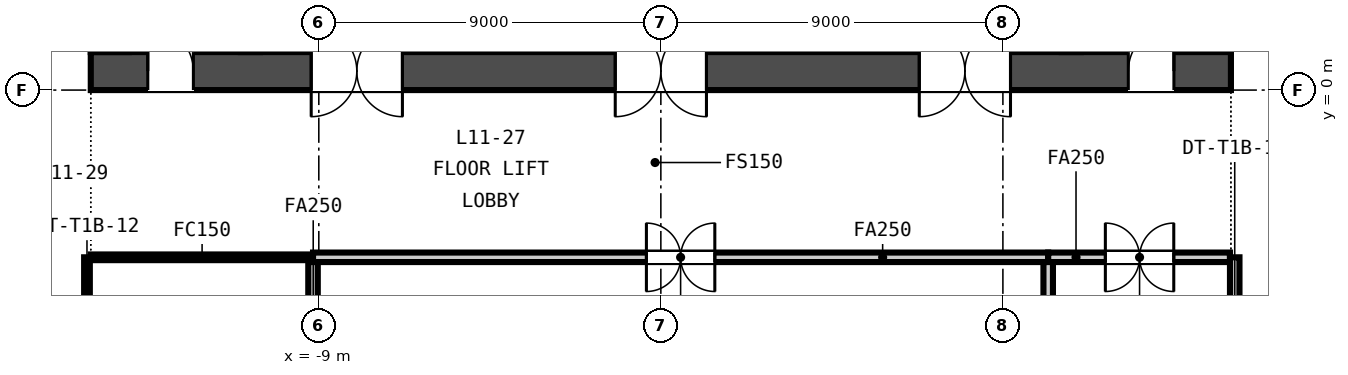
"""IFC4 building model, lengths in metres.
Left out: names, types, materials, properties, quantities, classifications, styles, units other than length and angle.
Written with IfcOpenShell. Run it as: python <this file> out.ifc"""

import sys

from ifc_helpers import new_model, si_unit, direction, frame, frame_2d, origin, place, context, subcontext, project, spatial, rectangle, extrude, element, fill, save


model = new_model("IFC4")
c1 = context("Model", 3, precision=1e-05, world=origin(), true_north=direction((0.0, 1.0)))
c2 = subcontext(c1, "Body", "Model", "MODEL_VIEW")
j1 = project(units=[si_unit("LENGTHUNIT", "METRE"), si_unit("PLANEANGLEUNIT", "RADIAN")], contexts=[c1])
p1 = place(None, origin())
s1 = spatial("IfcSite", under=j1, at=p1, CompositionType="ELEMENT")
p2 = place(p1, origin())
s2 = spatial("IfcBuilding", under=s1, at=p2, CompositionType="ELEMENT")
p3 = place(p2, frame((0.0, 0.0, 54.25)))
s3 = spatial("IfcBuildingStorey", under=s2, at=p3, CompositionType="ELEMENT", Elevation=54.25)
p4 = place(p3, frame((-15.0, 0.5, -0.15), z_axis=(0.0, 0.0, 1.0), x_axis=(1.0, 0.0, 0.0)))
e1 = element("IfcWall", 1, at=p4, inside=s3, PredefinedType="SOLIDWALL", context=c2, shape_type="SweptSolid", body=[
    extrude(rectangle(XDim=30.0, YDim=1.0, at=frame_2d((15.0, 0.0))), origin(), (0.0, 0.0, 1.0), 3.65),
])
p5 = place(p4, frame((5.8, 0.0, 0.15)))
e2 = element("IfcOpeningElement", 2, at=p5, cuts=e1, PredefinedType="OPENING", context=c2, shape_type="SweptSolid", body=[
    extrude(rectangle(XDim=2.4, YDim=2.4, at=frame_2d((1.2, 1.2))), frame((0.0, 0.51, 0.0), z_axis=(0.0, -1.0, 0.0), x_axis=(1.0, 0.0, 0.0)), (0.0, 0.0, 1.0), 1.02),
])
p6 = place(p4, frame((13.8, 0.0, 0.15)))
e3 = element("IfcOpeningElement", 3, at=p6, cuts=e1, PredefinedType="OPENING", context=c2, shape_type="SweptSolid", body=[
    extrude(rectangle(XDim=2.4, YDim=2.4, at=frame_2d((1.2, 1.2))), frame((0.0, 0.51, 0.0), z_axis=(0.0, -1.0, 0.0), x_axis=(1.0, 0.0, 0.0)), (0.0, 0.0, 1.0), 1.02),
])
p7 = place(p4, frame((21.8, 0.0, 0.15)))
e4 = element("IfcOpeningElement", 4, at=p7, cuts=e1, PredefinedType="OPENING", context=c2, shape_type="SweptSolid", body=[
    extrude(rectangle(XDim=2.4, YDim=2.4, at=frame_2d((1.2, 1.2))), frame((0.0, 0.51, 0.0), z_axis=(0.0, -1.0, 0.0), x_axis=(1.0, 0.0, 0.0)), (0.0, 0.0, 1.0), 1.02),
])
p8 = place(p4, frame((1.5, 0.0, 0.15)))
e5 = element("IfcOpeningElement", 5, at=p8, cuts=e1, PredefinedType="OPENING", context=c2, shape_type="SweptSolid", body=[
    extrude(rectangle(XDim=1.2, YDim=2.1, at=frame_2d((0.6, 1.05))), frame((0.0, 0.51, 0.0), z_axis=(0.0, -1.0, 0.0), x_axis=(1.0, 0.0, 0.0)), (0.0, 0.0, 1.0), 1.02),
])
p9 = place(p4, frame((27.3, 0.0, 0.15)))
e6 = element("IfcOpeningElement", 6, at=p9, cuts=e1, PredefinedType="OPENING", context=c2, shape_type="SweptSolid", body=[
    extrude(rectangle(XDim=1.2, YDim=2.1, at=frame_2d((0.6, 1.05))), frame((0.0, 0.51, 0.0), z_axis=(0.0, -1.0, 0.0), x_axis=(1.0, 0.0, 0.0)), (0.0, 0.0, 1.0), 1.02),
])
p10 = place(p3, frame((-9.152, -4.4, 0.0), z_axis=(0.0, 0.0, 1.0), x_axis=(-1.0, 0.0, 0.0)))
e7 = element("IfcWall", 7, at=p10, inside=s3, PredefinedType="PARTITIONING", context=c2, shape_type="SweptSolid", body=[
    extrude(rectangle(XDim=5.848, YDim=0.15, at=frame_2d((2.924, 0.0))), origin(), (0.0, 0.0, 1.0), 2.741),
])
p11 = place(p3, frame((10.192, -4.4, 0.0), z_axis=(0.0, 0.0, 1.0), x_axis=(-1.0, 0.0, 0.0)))
e8 = element("IfcWall", 8, at=p11, inside=s3, PredefinedType="PARTITIONING", context=c2, shape_type="SweptSolid", body=[
    extrude(rectangle(XDim=19.344, YDim=0.25, at=frame_2d((9.672, 0.0))), origin(), (0.0, 0.0, 1.0), 2.741),
])
p12 = place(p11, frame((8.772, 0.0, 0.0)))
e9 = element("IfcOpeningElement", 9, at=p12, cuts=e8, PredefinedType="OPENING", context=c2, shape_type="SweptSolid", body=[
    extrude(rectangle(XDim=1.8, YDim=2.1, at=frame_2d((0.9, 1.05))), frame((0.0, 0.135, 0.0), z_axis=(0.0, -1.0, 0.0), x_axis=(1.0, 0.0, 0.0)), (0.0, 0.0, 1.0), 0.27),
])
p13 = place(p3, frame((14.975, -4.4, 0.0), z_axis=(0.0, 0.0, 1.0), x_axis=(-1.0, 0.0, 0.0)))
e10 = element("IfcWall", 10, at=p13, inside=s3, PredefinedType="PARTITIONING", context=c2, shape_type="SweptSolid", body=[
    extrude(rectangle(XDim=4.783, YDim=0.25, at=frame_2d((2.392, 0.0))), origin(), (0.0, 0.0, 1.0), 2.741),
])
p14 = place(p13, frame((1.479, 0.0, 0.0)))
e11 = element("IfcOpeningElement", 11, at=p14, cuts=e10, PredefinedType="OPENING", context=c2, shape_type="SweptSolid", body=[
    extrude(rectangle(XDim=1.8, YDim=2.1, at=frame_2d((0.9, 1.05))), frame((0.0, 0.135, 0.0), z_axis=(0.0, -1.0, 0.0), x_axis=(1.0, 0.0, 0.0)), (0.0, 0.0, 1.0), 0.27),
])
p15 = place(p3, frame((-15.1, -4.4, 0.0), z_axis=(0.0, 0.0, 1.0), x_axis=(0.0, -1.0, 0.0)))
e12 = element("IfcWall", 12, at=p15, inside=s3, PredefinedType="PARTITIONING", context=c2, shape_type="SweptSolid", body=[
    extrude(rectangle(XDim=8.426, YDim=0.15, at=frame_2d((4.213, 0.0))), origin(), (0.0, 0.0, 1.0), 2.741),
])
p16 = place(p15, frame((3.713, 0.0, 0.0)))
e13 = element("IfcOpeningElement", 13, at=p16, cuts=e12, PredefinedType="OPENING", context=c2, shape_type="SweptSolid", body=[
    extrude(rectangle(XDim=1.0, YDim=2.1, at=frame_2d((0.5, 1.05))), frame((0.0, 0.085, 0.0), z_axis=(0.0, -1.0, 0.0), x_axis=(1.0, 0.0, 0.0)), (0.0, 0.0, 1.0), 0.17),
])
p17 = place(p3, frame((-9.152, -8.852, 0.0), z_axis=(0.0, 0.0, 1.0), x_axis=(0.0, 1.0, 0.0)))
e14 = element("IfcWall", 14, at=p17, inside=s3, PredefinedType="PARTITIONING", context=c2, shape_type="SweptSolid", body=[
    extrude(rectangle(XDim=4.327, YDim=0.25, at=frame_2d((2.164, 0.0))), origin(), (0.0, 0.0, 1.0), 2.741),
])
p18 = place(p3, frame((10.192, -29.22, 0.0), z_axis=(0.0, 0.0, 1.0), x_axis=(0.0, 1.0, 0.0)))
e15 = element("IfcWall", 15, at=p18, inside=s3, PredefinedType="PARTITIONING", context=c2, shape_type="SweptSolid", body=[
    extrude(rectangle(XDim=24.695, YDim=0.25, at=frame_2d((12.348, 0.0))), origin(), (0.0, 0.0, 1.0), 2.741),
])
p19 = place(p3, frame((15.1, -12.275, 0.0), z_axis=(0.0, 0.0, 1.0), x_axis=(0.0, 1.0, 0.0)))
e16 = element("IfcWall", 16, at=p19, inside=s3, PredefinedType="PARTITIONING", context=c2, shape_type="SweptSolid", body=[
    extrude(rectangle(XDim=7.875, YDim=0.25, at=frame_2d((3.938, 0.0))), origin(), (0.0, 0.0, 1.0), 2.741),
])
p20 = place(p19, frame((3.038, 0.0, 0.0)))
e17 = element("IfcOpeningElement", 17, at=p20, cuts=e16, PredefinedType="OPENING", context=c2, shape_type="SweptSolid", body=[
    extrude(rectangle(XDim=1.8, YDim=2.1, at=frame_2d((0.9, 1.05))), frame((0.0, 0.135, 0.0), z_axis=(0.0, -1.0, 0.0), x_axis=(1.0, 0.0, 0.0)), (0.0, 0.0, 1.0), 0.27),
])
p21 = place(p5, origin())
e18 = element("IfcDoor", 18, at=p21, inside=s3, OperationType="DOUBLE_DOOR_DOUBLE_SWING", PredefinedType="DOOR", context=c2, shape_type="SweptSolid", body=[
    extrude(rectangle(XDim=2.4, YDim=2.4, at=frame_2d((1.2, 1.2))), frame((0.0, 0.025, 0.0), z_axis=(0.0, -1.0, 0.0), x_axis=(1.0, 0.0, 0.0)), (0.0, 0.0, 1.0), 0.05),
])
fill(e2, e18)
p22 = place(p6, origin())
e19 = element("IfcDoor", 19, at=p22, inside=s3, OperationType="DOUBLE_DOOR_DOUBLE_SWING", PredefinedType="DOOR", context=c2, shape_type="SweptSolid", body=[
    extrude(rectangle(XDim=2.4, YDim=2.4, at=frame_2d((1.2, 1.2))), frame((0.0, 0.025, 0.0), z_axis=(0.0, -1.0, 0.0), x_axis=(1.0, 0.0, 0.0)), (0.0, 0.0, 1.0), 0.05),
])
fill(e3, e19)
p23 = place(p7, origin())
e20 = element("IfcDoor", 20, at=p23, inside=s3, OperationType="DOUBLE_DOOR_DOUBLE_SWING", PredefinedType="DOOR", context=c2, shape_type="SweptSolid", body=[
    extrude(rectangle(XDim=2.4, YDim=2.4, at=frame_2d((1.2, 1.2))), frame((0.0, 0.025, 0.0), z_axis=(0.0, -1.0, 0.0), x_axis=(1.0, 0.0, 0.0)), (0.0, 0.0, 1.0), 0.05),
])
fill(e4, e20)
p24 = place(p8, origin())
e21 = element("IfcDoor", 21, at=p24, inside=s3, OperationType="SINGLE_SWING_LEFT", PredefinedType="DOOR", context=c2, shape_type="SweptSolid", body=[
    extrude(rectangle(XDim=1.2, YDim=2.1, at=frame_2d((0.6, 1.05))), frame((0.0, 0.025, 0.0), z_axis=(0.0, -1.0, 0.0), x_axis=(1.0, 0.0, 0.0)), (0.0, 0.0, 1.0), 0.05),
])
fill(e5, e21)
p25 = place(p9, origin())
e22 = element("IfcDoor", 22, at=p25, inside=s3, OperationType="SINGLE_SWING_RIGHT", PredefinedType="DOOR", context=c2, shape_type="SweptSolid", body=[
    extrude(rectangle(XDim=1.2, YDim=2.1, at=frame_2d((0.6, 1.05))), frame((0.0, 0.025, 0.0), z_axis=(0.0, -1.0, 0.0), x_axis=(1.0, 0.0, 0.0)), (0.0, 0.0, 1.0), 0.05),
])
fill(e6, e22)
p26 = place(p12, origin())
e23 = element("IfcDoor", 23, at=p26, inside=s3, OperationType="DOUBLE_DOOR_DOUBLE_SWING", PredefinedType="DOOR", context=c2, shape_type="SweptSolid", body=[
    extrude(rectangle(XDim=1.8, YDim=2.1, at=frame_2d((0.9, 1.05))), frame((0.0, 0.025, 0.0), z_axis=(0.0, -1.0, 0.0), x_axis=(1.0, 0.0, 0.0)), (0.0, 0.0, 1.0), 0.05),
])
fill(e9, e23)
p27 = place(p14, origin())
e24 = element("IfcDoor", 24, at=p27, inside=s3, OperationType="DOUBLE_DOOR_DOUBLE_SWING", PredefinedType="DOOR", context=c2, shape_type="SweptSolid", body=[
    extrude(rectangle(XDim=1.8, YDim=2.1, at=frame_2d((0.9, 1.05))), frame((0.0, 0.025, 0.0), z_axis=(0.0, -1.0, 0.0), x_axis=(1.0, 0.0, 0.0)), (0.0, 0.0, 1.0), 0.05),
])
fill(e11, e24)
save(model, sys.argv[1])
